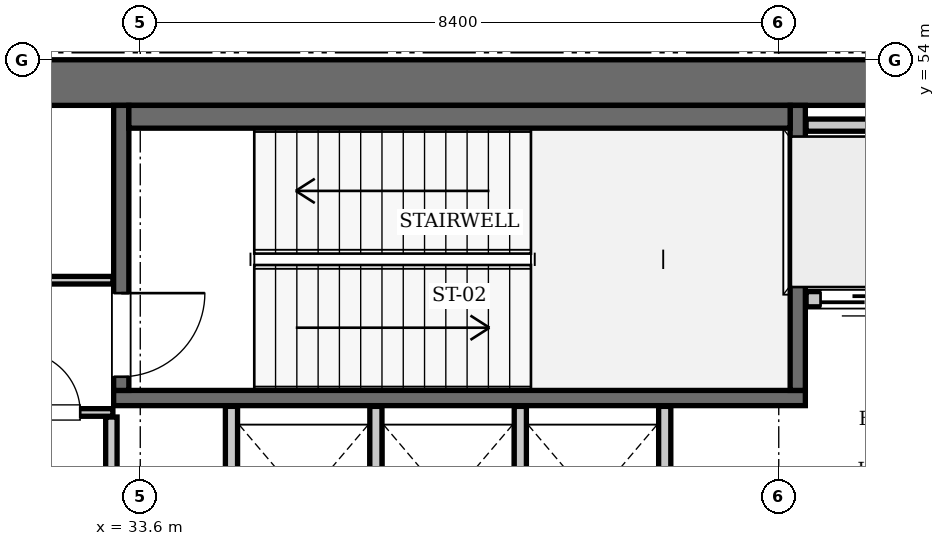
"""IFC4 building model, lengths in metres.
Left out: names, types, materials, properties, quantities, classifications, styles, units other than length and angle.
Written with IfcOpenShell. Run it as: python <this file> out.ifc"""

import sys

from ifc_helpers import new_model, si_unit, direction, frame, frame_2d, origin, place, context, subcontext, project, spatial, rectangle, extrude, element, fill, save


model = new_model("IFC4")
c1 = context("Model", 3, precision=1e-05, world=origin(), true_north=direction((0.0, 1.0)))
c2 = subcontext(c1, "Body", "Model", "MODEL_VIEW")
j1 = project(units=[si_unit("LENGTHUNIT", "METRE"), si_unit("PLANEANGLEUNIT", "RADIAN")], contexts=[c1])
p1 = place(None, origin())
s1 = spatial("IfcSite", under=j1, at=p1, CompositionType="ELEMENT")
p2 = place(p1, origin())
s2 = spatial("IfcBuilding", under=s1, at=p2, CompositionType="ELEMENT")
p3 = place(p2, frame((0.0, 0.0, 234.5)))
s3 = spatial("IfcBuildingStorey", under=s2, at=p3, CompositionType="ELEMENT", Elevation=234.5)
p4 = place(p3, frame((25.2, 53.7, 0.0), z_axis=(0.0, 0.0, 1.0), x_axis=(1.0, 0.0, 0.0)))
e1 = element("IfcWall", 1, at=p4, inside=s3, PredefinedType="SHEAR", context=c2, shape_type="SweptSolid", body=[
    extrude(rectangle(XDim=25.2, YDim=0.6, at=frame_2d((12.6, 0.0))), origin(), (0.0, 0.0, 1.0), 4.9),
])
p5 = place(p3, frame((33.25, 49.55, 0.0), z_axis=(0.0, 0.0, 1.0), x_axis=(1.0, 0.0, 0.0)))
e2 = element("IfcWall", 2, at=p5, inside=s3, PredefinedType="SOLIDWALL", context=c2, shape_type="SweptSolid", body=[
    extrude(rectangle(XDim=9.1, YDim=0.2, at=frame_2d((4.55, 0.0))), origin(), (0.0, 0.0, 1.0), 4.66),
])
p6 = place(p3, frame((42.25, 49.65, 0.0), z_axis=(0.0, 0.0, 1.0), x_axis=(0.0, 1.0, 0.0)))
e3 = element("IfcWall", 3, at=p6, inside=s3, PredefinedType="SOLIDWALL", context=c2, shape_type="SweptSolid", body=[
    extrude(rectangle(XDim=3.75, YDim=0.2, at=frame_2d((1.875, 0.0))), origin(), (0.0, 0.0, 1.0), 4.66),
])
p7 = place(p3, frame((33.35, 49.65, 0.0), z_axis=(0.0, 0.0, 1.0), x_axis=(0.0, 1.0, 0.0)))
e4 = element("IfcWall", 4, at=p7, inside=s3, PredefinedType="SOLIDWALL", context=c2, shape_type="SweptSolid", body=[
    extrude(rectangle(XDim=3.75, YDim=0.2, at=frame_2d((1.875, 0.0))), origin(), (0.0, 0.0, 1.0), 4.66),
])
p8 = place(p7, frame((0.18, 0.0, 0.0)))
e5 = element("IfcOpeningElement", 5, at=p8, cuts=e4, PredefinedType="OPENING", context=c2, shape_type="SweptSolid", body=[
    extrude(rectangle(XDim=1.1, YDim=2.15, at=frame_2d((0.55, 1.075))), frame((0.0, 0.11, 0.0), z_axis=(0.0, -1.0, 0.0), x_axis=(1.0, 0.0, 0.0)), (0.0, 0.0, 1.0), 0.22),
])
p9 = place(p3, frame((33.45, 53.25, 0.0), z_axis=(0.0, 0.0, 1.0), x_axis=(1.0, 0.0, 0.0)))
e6 = element("IfcWall", 6, at=p9, inside=s3, PredefinedType="SOLIDWALL", context=c2, shape_type="SweptSolid", body=[
    extrude(rectangle(XDim=8.7, YDim=0.3, at=frame_2d((4.35, 0.0))), origin(), (0.0, 0.0, 1.0), 4.66),
])
p10 = place(p3, frame((42.36, 50.85, 0.0), z_axis=(0.0, 0.0, 1.0), x_axis=(1.0, 0.0, 0.0)))
e7 = element("IfcWall", 7, at=p10, inside=s3, PredefinedType="SOLIDWALL", context=c2, shape_type="SweptSolid", body=[
    extrude(rectangle(XDim=1.38, YDim=0.2, at=frame_2d((0.69, 0.0))), origin(), (0.0, 0.0, 1.0), 4.66),
])
p11 = place(p10, frame((0.19, 0.0, 0.0)))
e8 = element("IfcOpeningElement", 8, at=p11, cuts=e7, PredefinedType="OPENING", context=c2, shape_type="SweptSolid", body=[
    extrude(rectangle(XDim=1.0, YDim=2.15, at=frame_2d((0.5, 1.075))), frame((0.0, 0.11, 0.0), z_axis=(0.0, -1.0, 0.0), x_axis=(1.0, 0.0, 0.0)), (0.0, 0.0, 1.0), 0.22),
])
p12 = place(p3, frame((42.36, 53.14, 0.0), z_axis=(0.0, 0.0, 1.0), x_axis=(1.0, 0.0, 0.0)))
e9 = element("IfcWall", 9, at=p12, inside=s3, PredefinedType="SOLIDWALL", context=c2, shape_type="SweptSolid", body=[
    extrude(rectangle(XDim=3.14, YDim=0.16, at=frame_2d((1.57, 0.0))), origin(), (0.0, 0.0, 1.0), 4.66),
])
for number, where, z_axis, x_axis in (
    (10, (34.8, 47.25, 0.0), (0.0, 0.0, 1.0), (0.0, 1.0, 0.0)),
    (11, (36.7, 47.25, 0.0), (0.0, 0.0, 1.0), (0.0, 1.0, 0.0)),
    (12, (38.6, 47.25, 0.0), (0.0, 0.0, 1.0), (0.0, 1.0, 0.0)),
    (13, (40.5, 47.25, 0.0), (0.0, 0.0, 1.0), (0.0, 1.0, 0.0)),
):
    element("IfcWall", number, at=place(p3, frame(where, z_axis=z_axis, x_axis=x_axis)), inside=s3, PredefinedType="SOLIDWALL", context=c2, shape_type="SweptSolid", body=[
        extrude(rectangle(XDim=2.19, YDim=0.16, at=frame_2d((1.095, 0.0))), origin(), (0.0, 0.0, 1.0), 4.66),
    ])
p13 = place(p3, frame((33.22, 45.14, 0.0), z_axis=(0.0, 0.0, 1.0), x_axis=(0.0, 1.0, 0.0)))
e14 = element("IfcWall", 14, at=p13, inside=s3, PredefinedType="PARTITIONING", context=c2, shape_type="SweptSolid", body=[
    extrude(rectangle(XDim=4.16, YDim=0.15, at=frame_2d((2.08, 0.0))), origin(), (0.0, 0.0, 1.0), 4.66),
])
p14 = place(p3, frame((30.06, 49.36, 0.0), z_axis=(0.0, 0.0, 1.0), x_axis=(1.0, 0.0, 0.0)))
e15 = element("IfcWall", 15, at=p14, inside=s3, PredefinedType="PARTITIONING", context=c2, shape_type="SweptSolid", body=[
    extrude(rectangle(XDim=3.18, YDim=0.1, at=frame_2d((1.59, 0.0))), origin(), (0.0, 0.0, 1.0), 4.66),
])
p15 = place(p14, frame((1.95, 0.0, 0.0)))
e16 = element("IfcOpeningElement", 16, at=p15, cuts=e15, PredefinedType="OPENING", context=c2, shape_type="SweptSolid", body=[
    extrude(rectangle(XDim=0.8, YDim=2.05, at=frame_2d((0.4, 1.025))), frame((0.0, 0.06, 0.0), z_axis=(0.0, -1.0, 0.0), x_axis=(1.0, 0.0, 0.0)), (0.0, 0.0, 1.0), 0.12),
])
p16 = place(p3, frame((31.82, 51.1, 0.0), z_axis=(0.0, 0.0, 1.0), x_axis=(1.0, 0.0, 0.0)))
e17 = element("IfcWall", 17, at=p16, inside=s3, PredefinedType="PARTITIONING", context=c2, shape_type="SweptSolid", body=[
    extrude(rectangle(XDim=1.42, YDim=0.1, at=frame_2d((0.71, 0.0))), origin(), (0.0, 0.0, 1.0), 4.66),
])
p17 = place(p8, frame((1.1, 0.0, 0.0), z_axis=(0.0, 0.0, 1.0), x_axis=(-1.0, 0.0, 0.0)))
e18 = element("IfcDoor", 18, at=p17, inside=s3, OperationType="SINGLE_SWING_LEFT", PredefinedType="DOOR", context=c2, shape_type="SweptSolid", body=[
    extrude(rectangle(XDim=1.1, YDim=2.15, at=frame_2d((0.55, 1.075))), frame((0.0, 0.025, 0.0), z_axis=(0.0, -1.0, 0.0), x_axis=(1.0, 0.0, 0.0)), (0.0, 0.0, 1.0), 0.05),
])
fill(e5, e18)
p18 = place(p11, frame((1.0, 0.0, 0.0), z_axis=(0.0, 0.0, 1.0), x_axis=(-1.0, 0.0, 0.0)))
e19 = element("IfcDoor", 19, at=p18, inside=s3, OperationType="SLIDING_TO_LEFT", PredefinedType="DOOR", context=c2, shape_type="SweptSolid", body=[
    extrude(rectangle(XDim=1.0, YDim=2.15, at=frame_2d((0.5, 1.075))), frame((0.0, 0.025, 0.0), z_axis=(0.0, -1.0, 0.0), x_axis=(1.0, 0.0, 0.0)), (0.0, 0.0, 1.0), 0.05),
])
fill(e8, e19)
p19 = place(p15, origin())
e20 = element("IfcDoor", 20, at=p19, inside=s3, OperationType="SINGLE_SWING_LEFT", PredefinedType="DOOR", context=c2, shape_type="SweptSolid", body=[
    extrude(rectangle(XDim=0.8, YDim=2.05, at=frame_2d((0.4, 1.025))), frame((0.0, 0.025, 0.0), z_axis=(0.0, -1.0, 0.0), x_axis=(1.0, 0.0, 0.0)), (0.0, 0.0, 1.0), 0.05),
])
fill(e16, e20)
save(model, sys.argv[1])
